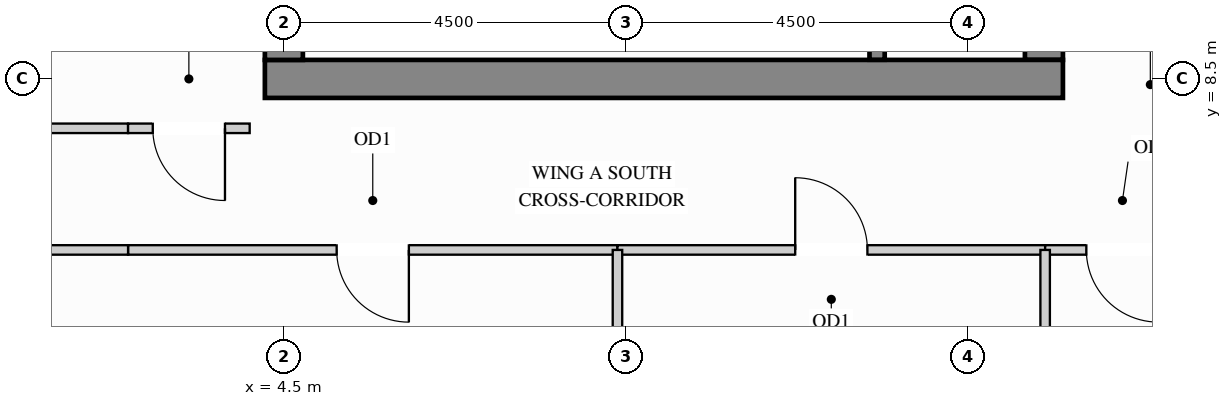
"""IFC4 building model, lengths in metres.
Left out: names, types, materials, properties, quantities, classifications, styles, units other than length and angle.
Written with IfcOpenShell. Run it as: python <this file> out.ifc"""

import sys

from ifc_helpers import new_model, si_unit, direction, frame, frame_2d, origin, place, context, subcontext, project, spatial, rectangle, extrude, source, transform, mapped, element, fill, save


model = new_model("IFC4")
c1 = context("Model", 3, precision=1e-05, world=origin(), true_north=direction((0.0, 1.0)))
c2 = subcontext(c1, "Body", "Model", "MODEL_VIEW")
j1 = project(units=[si_unit("LENGTHUNIT", "METRE"), si_unit("PLANEANGLEUNIT", "RADIAN")], contexts=[c1])
p1 = place(None, origin())
s1 = spatial("IfcSite", under=j1, at=p1, CompositionType="ELEMENT")
p2 = place(p1, origin())
s2 = spatial("IfcBuilding", under=s1, at=p2, CompositionType="ELEMENT")
p3 = place(p2, frame((0.0, 0.0, 226.8)))
s3 = spatial("IfcBuildingStorey", under=s2, at=p3, CompositionType="ELEMENT", Elevation=226.8)
m1 = source(origin(), c2, "Body", "SweptSolid", [
    extrude(rectangle(XDim=10.07, YDim=0.5, at=frame_2d((5.035, 0.0))), origin(), (0.0, 0.0, 1.0), 3.4),
])
p4 = place(p3, frame((14.5, 8.75, 0.0), z_axis=(0.0, 0.0, 1.0), x_axis=(0.0, 1.0, 0.0)))
e1 = element("IfcWall", 1, at=p4, inside=s3, PredefinedType="SHEAR", context=c2, shape_type="MappedRepresentation", body=[
    mapped(m1, transform((0.0, 0.0, 0.0), x_axis=(1.0, 0.0, 0.0), y_axis=(0.0, 1.0, 0.0), z_axis=(0.0, 0.0, 1.0))),
])
m2 = source(origin(), c2, "Body", "SweptSolid", [
    extrude(rectangle(XDim=10.5, YDim=0.5, at=frame_2d((5.25, 0.0))), origin(), (0.0, 0.0, 1.0), 3.4),
])
p5 = place(p3, frame((4.25, 8.5, 0.0), z_axis=(0.0, 0.0, 1.0), x_axis=(1.0, 0.0, 0.0)))
e2 = element("IfcWall", 2, at=p5, inside=s3, PredefinedType="SHEAR", context=c2, shape_type="MappedRepresentation", body=[
    mapped(m2, transform((0.0, 0.0, 0.0), x_axis=(1.0, 0.0, 0.0), y_axis=(0.0, 1.0, 0.0), z_axis=(0.0, 0.0, 1.0))),
])
m3 = source(origin(), c2, "Body", "SweptSolid", [
    extrude(rectangle(XDim=20.5, YDim=0.5, at=frame_2d((10.25, 0.0))), origin(), (0.0, 0.0, 1.0), 3.4),
])
p6 = place(p3, frame((4.5, 8.75, 0.0), z_axis=(0.0, 0.0, 1.0), x_axis=(0.0, 1.0, 0.0)))
e3 = element("IfcWall", 3, at=p6, inside=s3, PredefinedType="SHEAR", context=c2, shape_type="MappedRepresentation", body=[
    mapped(m3, transform((0.0, 0.0, 0.0), x_axis=(1.0, 0.0, 0.0), y_axis=(0.0, 1.0, 0.0), z_axis=(0.0, 0.0, 1.0))),
])
m4 = source(origin(), c2, "Body", "SweptSolid", [
    extrude(rectangle(XDim=2.098, YDim=0.125, at=frame_2d((1.049, 0.0))), origin(), (0.0, 0.0, 1.0), 3.385),
])
p7 = place(p3, frame((0.352, 7.85, 0.0), z_axis=(0.0, 0.0, 1.0), x_axis=(1.0, 0.0, 0.0)))
e4 = element("IfcWall", 4, at=p7, inside=s3, PredefinedType="PARTITIONING", context=c2, shape_type="MappedRepresentation", body=[
    mapped(m4, transform((0.0, 0.0, 0.0), x_axis=(1.0, 0.0, 0.0), y_axis=(0.0, 1.0, 0.0), z_axis=(0.0, 0.0, 1.0))),
])
p8 = place(p3, frame((2.45, 7.85, 0.0), z_axis=(0.0, 0.0, 1.0), x_axis=(1.0, 0.0, 0.0)))
e5 = element("IfcWall", 5, at=p8, inside=s3, PredefinedType="PARTITIONING", context=c2, shape_type="SweptSolid", body=[
    extrude(rectangle(XDim=1.6, YDim=0.125, at=frame_2d((0.8, 0.0))), origin(), (0.0, 0.0, 1.0), 3.385),
])
p9 = place(p8, frame((0.325, 0.0, 0.0)))
e6 = element("IfcOpeningElement", 6, at=p9, cuts=e5, PredefinedType="OPENING", context=c2, shape_type="SweptSolid", body=[
    extrude(rectangle(XDim=0.95, YDim=2.15, at=frame_2d((0.475, 1.075))), frame((0.0, 0.073, 0.0), z_axis=(0.0, -1.0, 0.0), x_axis=(1.0, 0.0, 0.0)), (0.0, 0.0, 1.0), 0.145),
])
p10 = place(p3, frame((2.45, 6.25, 0.0), z_axis=(0.0, 0.0, 1.0), x_axis=(1.0, 0.0, 0.0)))
e7 = element("IfcWall", 7, at=p10, inside=s3, PredefinedType="PARTITIONING", context=c2, shape_type="SweptSolid", body=[
    extrude(rectangle(XDim=6.439, YDim=0.125, at=frame_2d((3.219, 0.0))), origin(), (0.0, 0.0, 1.0), 2.848),
])
p11 = place(p10, frame((2.744, 0.0, 0.0)))
e8 = element("IfcOpeningElement", 8, at=p11, cuts=e7, PredefinedType="OPENING", context=c2, shape_type="SweptSolid", body=[
    extrude(rectangle(XDim=0.95, YDim=2.15, at=frame_2d((0.475, 1.075))), frame((0.0, 0.073, 0.0), z_axis=(0.0, -1.0, 0.0), x_axis=(1.0, 0.0, 0.0)), (0.0, 0.0, 1.0), 0.145),
])
p12 = place(p3, frame((8.889, 6.25, 0.0), z_axis=(0.0, 0.0, 1.0), x_axis=(1.0, 0.0, 0.0)))
e9 = element("IfcWall", 9, at=p12, inside=s3, PredefinedType="PARTITIONING", context=c2, shape_type="SweptSolid", body=[
    extrude(rectangle(XDim=5.627, YDim=0.125, at=frame_2d((2.813, 0.0))), origin(), (0.0, 0.0, 1.0), 2.848),
])
p13 = place(p12, frame((2.338, 0.0, 0.0)))
e10 = element("IfcOpeningElement", 10, at=p13, cuts=e9, PredefinedType="OPENING", context=c2, shape_type="SweptSolid", body=[
    extrude(rectangle(XDim=0.95, YDim=2.15, at=frame_2d((0.475, 1.075))), frame((0.0, 0.073, 0.0), z_axis=(0.0, -1.0, 0.0), x_axis=(1.0, 0.0, 0.0)), (0.0, 0.0, 1.0), 0.145),
])
p14 = place(p3, frame((14.516, 6.25, 0.0), z_axis=(0.0, 0.0, 1.0), x_axis=(1.0, 0.0, 0.0)))
e11 = element("IfcWall", 11, at=p14, inside=s3, PredefinedType="PARTITIONING", context=c2, shape_type="SweptSolid", body=[
    extrude(rectangle(XDim=2.034, YDim=0.125, at=frame_2d((1.017, 0.0))), origin(), (0.0, 0.0, 1.0), 2.848),
])
p15 = place(p14, frame((0.542, 0.0, 0.0)))
e12 = element("IfcOpeningElement", 12, at=p15, cuts=e11, PredefinedType="OPENING", context=c2, shape_type="SweptSolid", body=[
    extrude(rectangle(XDim=0.95, YDim=2.15, at=frame_2d((0.475, 1.075))), frame((0.0, 0.073, 0.0), z_axis=(0.0, -1.0, 0.0), x_axis=(1.0, 0.0, 0.0)), (0.0, 0.0, 1.0), 0.145),
])
m5 = source(origin(), c2, "Body", "SweptSolid", [
    extrude(rectangle(XDim=2.098, YDim=0.125, at=frame_2d((1.049, 0.0))), origin(), (0.0, 0.0, 1.0), 2.848),
])
p16 = place(p3, frame((0.352, 6.25, 0.0), z_axis=(0.0, 0.0, 1.0), x_axis=(1.0, 0.0, 0.0)))
e13 = element("IfcWall", 13, at=p16, inside=s3, PredefinedType="PARTITIONING", context=c2, shape_type="MappedRepresentation", body=[
    mapped(m5, transform((0.0, 0.0, 0.0), x_axis=(1.0, 0.0, 0.0), y_axis=(0.0, 1.0, 0.0), z_axis=(0.0, 0.0, 1.0))),
])
m6 = source(origin(), c2, "Body", "SweptSolid", [
    extrude(rectangle(XDim=5.2, YDim=0.125, at=frame_2d((2.6, 0.0))), origin(), (0.0, 0.0, 1.0), 3.385),
])
for number, where, z_axis, x_axis in (
    (14, (8.889, 1.05, 0.0), (0.0, 0.0, 1.0), (0.0, 1.0, 0.0)),
    (15, (14.516, 1.05, 0.0), (0.0, 0.0, 1.0), (0.0, 1.0, 0.0)),
):
    element("IfcWall", number, at=place(p3, frame(where, z_axis=z_axis, x_axis=x_axis)), inside=s3, PredefinedType="PARTITIONING", context=c2, shape_type="MappedRepresentation", body=[
        mapped(m6, transform((0.0, 0.0, 0.0), x_axis=(1.0, 0.0, 0.0), y_axis=(0.0, 1.0, 0.0), z_axis=(0.0, 0.0, 1.0))),
    ])
m7 = source(origin(), c2, "Body", "SweptSolid", [
    extrude(rectangle(XDim=3.803, YDim=0.2, at=frame_2d((1.901, 0.0))), origin(), (0.0, 0.0, 1.0), 3.4),
])
p17 = place(p3, frame((12.305, 8.752, 0.0), z_axis=(0.0, 0.0, 1.0), x_axis=(0.0, 1.0, 0.0)))
e16 = element("IfcWall", 16, at=p17, inside=s3, PredefinedType="SHEAR", context=c2, shape_type="MappedRepresentation", body=[
    mapped(m7, transform((0.0, 0.0, 0.0), x_axis=(1.0, 0.0, 0.0), y_axis=(0.0, 1.0, 0.0), z_axis=(0.0, 0.0, 1.0))),
])
m8 = source(origin(), c2, "Body", "SweptSolid", [
    extrude(rectangle(XDim=0.95, YDim=2.15, at=frame_2d((0.475, 1.075))), frame((0.0, 0.025, 0.0), z_axis=(0.0, -1.0, 0.0), x_axis=(1.0, 0.0, 0.0)), (0.0, 0.0, 1.0), 0.05),
])
p18 = place(p11, origin())
e17 = element("IfcDoor", 17, at=p18, inside=s3, OperationType="SINGLE_SWING_RIGHT", PredefinedType="DOOR", context=c2, shape_type="MappedRepresentation", body=[
    mapped(m8, transform((0.0, 0.0, 0.0), x_axis=(1.0, 0.0, 0.0), y_axis=(0.0, 1.0, 0.0), z_axis=(0.0, 0.0, 1.0))),
])
fill(e8, e17)
p19 = place(p13, origin())
e18 = element("IfcDoor", 18, at=p19, inside=s3, OperationType="SINGLE_SWING_LEFT", PredefinedType="DOOR", context=c2, shape_type="MappedRepresentation", body=[
    mapped(m8, transform((0.0, 0.0, 0.0), x_axis=(1.0, 0.0, 0.0), y_axis=(0.0, 1.0, 0.0), z_axis=(0.0, 0.0, 1.0))),
])
fill(e10, e18)
p20 = place(p15, origin())
e19 = element("IfcDoor", 19, at=p20, inside=s3, OperationType="SINGLE_SWING_RIGHT", PredefinedType="DOOR", context=c2, shape_type="MappedRepresentation", body=[
    mapped(m8, transform((0.0, 0.0, 0.0), x_axis=(1.0, 0.0, 0.0), y_axis=(0.0, 1.0, 0.0), z_axis=(0.0, 0.0, 1.0))),
])
fill(e12, e19)
p21 = place(p9, origin())
e20 = element("IfcDoor", 20, at=p21, inside=s3, OperationType="SINGLE_SWING_RIGHT", PredefinedType="DOOR", context=c2, shape_type="MappedRepresentation", body=[
    mapped(m8, transform((0.0, 0.0, 0.0), x_axis=(1.0, 0.0, 0.0), y_axis=(0.0, 1.0, 0.0), z_axis=(0.0, 0.0, 1.0))),
])
fill(e6, e20)
save(model, sys.argv[1])
